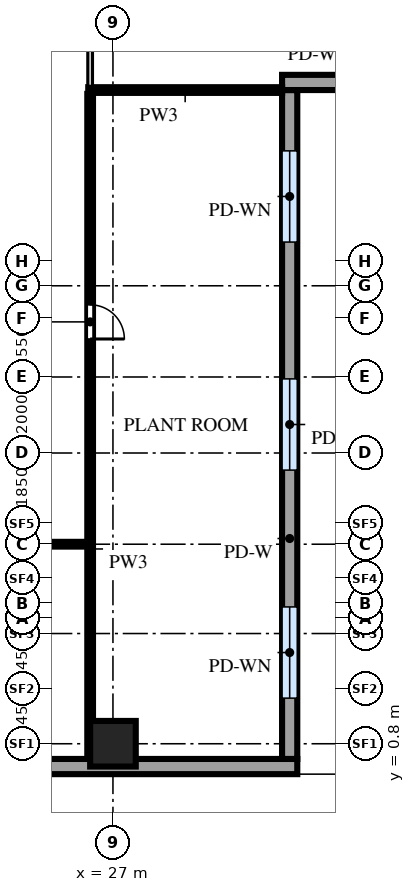
"""IFC4 building model, lengths in metres.
Left out: names, types, materials, properties, quantities, classifications, styles, units other than length and angle.
Written with IfcOpenShell. Run it as: python <this file> out.ifc"""

import sys

from ifc_helpers import new_model, si_unit, direction, frame, frame_2d, origin, origin_2d, place, context, subcontext, project, spatial, rectangle, extrude, source, transform, mapped, element, fill, save


model = new_model("IFC4")
c1 = context("Model", 3, precision=1e-05, world=origin(), true_north=direction((0.0, 1.0)))
c2 = subcontext(c1, "Body", "Model", "MODEL_VIEW")
j1 = project(units=[si_unit("LENGTHUNIT", "METRE"), si_unit("PLANEANGLEUNIT", "RADIAN")], contexts=[c1])
p1 = place(None, origin())
s1 = spatial("IfcSite", under=j1, at=p1, CompositionType="ELEMENT")
p2 = place(p1, origin())
s2 = spatial("IfcBuilding", under=s1, at=p2, CompositionType="ELEMENT")
p3 = place(p2, frame((0.0, 0.0, 28.5)))
s3 = spatial("IfcBuildingStorey", under=s2, at=p3, CompositionType="ELEMENT", Elevation=28.5)
m1 = source(origin(), c2, "Body", "SweptSolid", [
    extrude(rectangle(XDim=1.2, YDim=1.2, at=origin_2d()), origin(), (0.0, 0.0, 1.0), 4.0),
])
p4 = place(p3, frame((27.0, 0.8, 0.0), z_axis=(0.0, 0.0, 1.0), x_axis=(1.0, 0.0, 0.0)))
e1 = element("IfcColumn", 1, at=p4, inside=s3, PredefinedType="COLUMN", context=c2, shape_type="MappedRepresentation", body=[
    mapped(m1, transform((0.0, 0.0, 0.0))),
])
m2 = source(origin(), c2, "Body", "SweptSolid", [
    extrude(rectangle(XDim=33.64, YDim=0.4, at=frame_2d((16.82, 0.0))), origin(), (0.0, 0.0, 1.0), 4.2),
])
p5 = place(p3, frame((-1.79, 0.2, 0.0), z_axis=(0.0, 0.0, 1.0), x_axis=(1.0, 0.0, 0.0)))
e2 = element("IfcWall", 2, at=p5, inside=s3, PredefinedType="SOLIDWALL", context=c2, shape_type="MappedRepresentation", body=[
    mapped(m2, transform((0.0, 0.0, 0.0))),
])
m3 = source(origin(), c2, "Body", "SweptSolid", [
    extrude(rectangle(XDim=2.4, YDim=2.4, at=frame_2d((1.2, 1.2))), frame((0.0, 0.21, 0.0), z_axis=(0.0, -1.0, 0.0), x_axis=(1.0, 0.0, 0.0)), (0.0, 0.0, 1.0), 0.42),
])
p6 = place(p5, frame((9.6, 0.0, 1.0)))
e3 = element("IfcOpeningElement", 3, at=p6, cuts=e2, PredefinedType="OPENING", context=c2, shape_type="MappedRepresentation", body=[
    mapped(m3, transform((0.0, 0.0, 0.0))),
])
p7 = place(p5, frame((15.6, 0.0, 1.0)))
e4 = element("IfcOpeningElement", 4, at=p7, cuts=e2, PredefinedType="OPENING", context=c2, shape_type="MappedRepresentation", body=[
    mapped(m3, transform((0.0, 0.0, 0.0))),
])
m4 = source(origin(), c2, "Body", "SweptSolid", [
    extrude(rectangle(XDim=17.6, YDim=0.4, at=frame_2d((8.8, 0.0))), origin(), (0.0, 0.0, 1.0), 4.2),
])
p8 = place(p3, frame((31.65, 0.4, 0.0), z_axis=(0.0, 0.0, 1.0), x_axis=(0.0, 1.0, 0.0)))
e5 = element("IfcWall", 5, at=p8, inside=s3, PredefinedType="SOLIDWALL", context=c2, shape_type="MappedRepresentation", body=[
    mapped(m4, transform((0.0, 0.0, 0.0))),
])
p9 = place(p8, frame((1.6, 0.0, 1.0)))
e6 = element("IfcOpeningElement", 6, at=p9, cuts=e5, PredefinedType="OPENING", context=c2, shape_type="MappedRepresentation", body=[
    mapped(m3, transform((0.0, 0.0, 0.0))),
])
p10 = place(p8, frame((7.6, 0.0, 1.0)))
e7 = element("IfcOpeningElement", 7, at=p10, cuts=e5, PredefinedType="OPENING", context=c2, shape_type="MappedRepresentation", body=[
    mapped(m3, transform((0.0, 0.0, 0.0))),
])
p11 = place(p8, frame((13.6, 0.0, 1.0)))
e8 = element("IfcOpeningElement", 8, at=p11, cuts=e5, PredefinedType="OPENING", context=c2, shape_type="MappedRepresentation", body=[
    mapped(m3, transform((0.0, 0.0, 0.0))),
])
m5 = source(origin(), c2, "Body", "SweptSolid", [
    extrude(rectangle(XDim=8.7, YDim=0.4, at=frame_2d((4.35, 0.0))), origin(), (0.0, 0.0, 1.0), 4.2),
])
p12 = place(p3, frame((31.45, 18.2, 0.0), z_axis=(0.0, 0.0, 1.0), x_axis=(1.0, 0.0, 0.0)))
e9 = element("IfcWall", 9, at=p12, inside=s3, PredefinedType="SOLIDWALL", context=c2, shape_type="MappedRepresentation", body=[
    mapped(m5, transform((0.0, 0.0, 0.0))),
])
p13 = place(p12, frame((3.15, 0.0, 1.0)))
e10 = element("IfcOpeningElement", 10, at=p13, cuts=e9, PredefinedType="OPENING", context=c2, shape_type="MappedRepresentation", body=[
    mapped(m3, transform((0.0, 0.0, 0.0))),
])
m6 = source(origin(), c2, "Body", "SweptSolid", [
    extrude(rectangle(XDim=17.5, YDim=0.15, at=frame_2d((8.75, 0.0))), origin(), (0.0, 0.0, 1.0), 4.0),
])
p14 = place(p3, frame((26.4, 0.4, 0.0), z_axis=(0.0, 0.0, 1.0), x_axis=(0.0, 1.0, 0.0)))
e11 = element("IfcWall", 11, at=p14, inside=s3, PredefinedType="PARTITIONING", context=c2, shape_type="MappedRepresentation", body=[
    mapped(m6, transform((0.0, 0.0, 0.0))),
])
m7 = source(origin(), c2, "Body", "SweptSolid", [
    extrude(rectangle(XDim=0.9, YDim=2.1, at=frame_2d((0.45, 1.05))), frame((0.0, 0.085, 0.0), z_axis=(0.0, -1.0, 0.0), x_axis=(1.0, 0.0, 0.0)), (0.0, 0.0, 1.0), 0.17),
])
p15 = place(p14, frame((11.05, 0.0, 0.0)))
e12 = element("IfcOpeningElement", 12, at=p15, cuts=e11, PredefinedType="OPENING", context=c2, shape_type="MappedRepresentation", body=[
    mapped(m7, transform((0.0, 0.0, 0.0))),
])
m8 = source(origin(), c2, "Body", "SweptSolid", [
    extrude(rectangle(XDim=22.15, YDim=0.125, at=frame_2d((11.075, 0.0))), origin(), (0.0, 0.0, 1.0), 4.0),
])
p16 = place(p3, frame((4.15, 6.05, 0.0), z_axis=(0.0, 0.0, 1.0), x_axis=(1.0, 0.0, 0.0)))
e13 = element("IfcWall", 13, at=p16, inside=s3, PredefinedType="PARTITIONING", context=c2, shape_type="MappedRepresentation", body=[
    mapped(m8, transform((0.0, 0.0, 0.0))),
])
m9 = source(origin(), c2, "Body", "SweptSolid", [
    extrude(rectangle(XDim=1.2, YDim=2.1, at=frame_2d((0.6, 1.05))), frame((0.0, 0.073, 0.0), z_axis=(0.0, -1.0, 0.0), x_axis=(1.0, 0.0, 0.0)), (0.0, 0.0, 1.0), 0.145),
])
p17 = place(p16, frame((9.2, 0.0, 0.0)))
e14 = element("IfcOpeningElement", 14, at=p17, cuts=e13, PredefinedType="OPENING", context=c2, shape_type="MappedRepresentation", body=[
    mapped(m9, transform((0.0, 0.0, 0.0))),
])
m10 = source(origin(), c2, "Body", "SweptSolid", [
    extrude(rectangle(XDim=5.1, YDim=0.15, at=frame_2d((2.55, 0.0))), origin(), (0.0, 0.0, 1.0), 4.0),
])
p18 = place(p3, frame((26.35, 18.0, 0.0), z_axis=(0.0, 0.0, 1.0), x_axis=(1.0, 0.0, 0.0)))
e15 = element("IfcWall", 15, at=p18, inside=s3, PredefinedType="PARTITIONING", context=c2, shape_type="MappedRepresentation", body=[
    mapped(m10, transform((0.0, 0.0, 0.0))),
])
m11 = source(origin(), c2, "Body", "SweptSolid", [
    extrude(rectangle(XDim=15.2, YDim=0.125, at=frame_2d((7.6, 0.0))), origin(), (0.0, 0.0, 1.0), 4.0),
])
p19 = place(p3, frame((26.4, 18.1, 0.0), z_axis=(0.0, 0.0, 1.0), x_axis=(0.0, 1.0, 0.0)))
e16 = element("IfcWall", 16, at=p19, inside=s3, PredefinedType="PARTITIONING", context=c2, shape_type="MappedRepresentation", body=[
    mapped(m11, transform((0.0, 0.0, 0.0))),
])
p20 = place(p19, frame((3.3, 0.0, 0.0)))
e17 = element("IfcOpeningElement", 17, at=p20, cuts=e16, PredefinedType="OPENING", context=c2, shape_type="MappedRepresentation", body=[
    mapped(m9, transform((0.0, 0.0, 0.0))),
])
m12 = source(origin(), c2, "Body", "SweptSolid", [
    extrude(rectangle(XDim=2.4, YDim=2.4, at=frame_2d((1.2, 1.2))), frame((0.0, 0.03, 0.0), z_axis=(0.0, -1.0, 0.0), x_axis=(1.0, 0.0, 0.0)), (0.0, 0.0, 1.0), 0.06),
])
p21 = place(p9, origin())
e18 = element("IfcWindow", 18, at=p21, inside=s3, PartitioningType="SINGLE_PANEL", PredefinedType="WINDOW", context=c2, shape_type="MappedRepresentation", body=[
    mapped(m12, transform((0.0, 0.0, 0.0))),
])
fill(e6, e18)
p22 = place(p10, origin())
e19 = element("IfcWindow", 19, at=p22, inside=s3, PartitioningType="SINGLE_PANEL", PredefinedType="WINDOW", context=c2, shape_type="MappedRepresentation", body=[
    mapped(m12, transform((0.0, 0.0, 0.0))),
])
fill(e7, e19)
p23 = place(p11, origin())
e20 = element("IfcWindow", 20, at=p23, inside=s3, PartitioningType="SINGLE_PANEL", PredefinedType="WINDOW", context=c2, shape_type="MappedRepresentation", body=[
    mapped(m12, transform((0.0, 0.0, 0.0))),
])
fill(e8, e20)
m13 = source(origin(), c2, "Body", "SweptSolid", [
    extrude(rectangle(XDim=0.9, YDim=2.1, at=frame_2d((0.45, 1.05))), frame((0.0, 0.025, 0.0), z_axis=(0.0, -1.0, 0.0), x_axis=(1.0, 0.0, 0.0)), (0.0, 0.0, 1.0), 0.05),
])
p24 = place(p15, origin())
e21 = element("IfcDoor", 21, at=p24, inside=s3, OperationType="SINGLE_SWING_LEFT", PredefinedType="DOOR", context=c2, shape_type="MappedRepresentation", body=[
    mapped(m13, transform((0.0, 0.0, 0.0))),
])
fill(e12, e21)
save(model, sys.argv[1])
